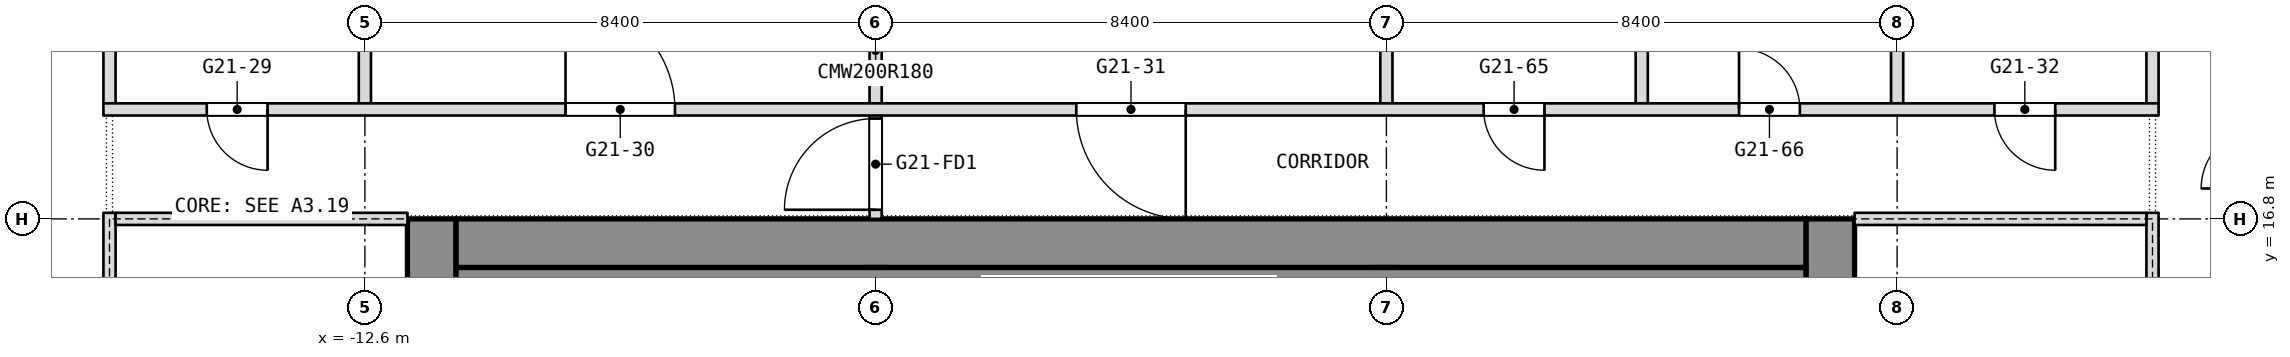
"""IFC4 building model, lengths in metres.
Left out: names, types, materials, properties, quantities, classifications, styles, units other than length and angle.
Written with IfcOpenShell. Run it as: python <this file> out.ifc"""

import sys

from ifc_helpers import new_model, si_unit, direction, frame, frame_2d, origin, place, context, subcontext, project, spatial, rectangle, extrude, element, fill, save


model = new_model("IFC4")
c1 = context("Model", 3, precision=1e-05, world=origin(), true_north=direction((0.0, 1.0)))
c2 = subcontext(c1, "Body", "Model", "MODEL_VIEW")
j1 = project(units=[si_unit("LENGTHUNIT", "METRE"), si_unit("PLANEANGLEUNIT", "RADIAN")], contexts=[c1])
p1 = place(None, origin())
s1 = spatial("IfcSite", under=j1, at=p1, CompositionType="ELEMENT")
p2 = place(p1, origin())
s2 = spatial("IfcBuilding", under=s1, at=p2, CompositionType="ELEMENT")
p3 = place(p2, frame((0.0, 0.0, 248.9)))
s3 = spatial("IfcBuildingStorey", under=s2, at=p3, CompositionType="ELEMENT", Elevation=248.9)
p4 = place(p3, frame((11.5, 0.0, 0.0), z_axis=(0.0, 0.0, 1.0), x_axis=(0.0, 1.0, 0.0)))
e1 = element("IfcWall", 1, at=p4, inside=s3, PredefinedType="SHEAR", context=c2, shape_type="SweptSolid", body=[
    extrude(rectangle(XDim=16.8, YDim=0.8, at=frame_2d((8.4, 0.0))), origin(), (0.0, 0.0, 1.0), 3.6),
])
p5 = place(p4, frame((2.3, 0.0, 0.0)))
e2 = element("IfcOpeningElement", 2, at=p5, cuts=e1, PredefinedType="OPENING", context=c2, shape_type="SweptSolid", body=[
    extrude(rectangle(XDim=1.1, YDim=2.1, at=frame_2d((0.55, 1.05))), frame((0.0, 0.4, 0.0), z_axis=(0.0, -1.0, 0.0), x_axis=(1.0, 0.0, 0.0)), (0.0, 0.0, 1.0), 0.8),
])
p6 = place(p4, frame((4.85, 0.0, 0.0)))
e3 = element("IfcOpeningElement", 3, at=p6, cuts=e1, PredefinedType="OPENING", context=c2, shape_type="SweptSolid", body=[
    extrude(rectangle(XDim=1.1, YDim=2.1, at=frame_2d((0.55, 1.05))), frame((0.0, 0.4, 0.0), z_axis=(0.0, -1.0, 0.0), x_axis=(1.0, 0.0, 0.0)), (0.0, 0.0, 1.0), 0.8),
])
p7 = place(p4, frame((6.825, 0.0, 0.0)))
e4 = element("IfcOpeningElement", 4, at=p7, cuts=e1, PredefinedType="OPENING", context=c2, shape_type="SweptSolid", body=[
    extrude(rectangle(XDim=1.2, YDim=2.1, at=frame_2d((0.6, 1.05))), frame((0.0, 0.4, 0.0), z_axis=(0.0, -1.0, 0.0), x_axis=(1.0, 0.0, 0.0)), (0.0, 0.0, 1.0), 0.8),
])
p8 = place(p4, frame((13.4, 0.0, 0.0)))
e5 = element("IfcOpeningElement", 5, at=p8, cuts=e1, PredefinedType="OPENING", context=c2, shape_type="SweptSolid", body=[
    extrude(rectangle(XDim=1.1, YDim=2.1, at=frame_2d((0.55, 1.05))), frame((0.0, 0.4, 0.0), z_axis=(0.0, -1.0, 0.0), x_axis=(1.0, 0.0, 0.0)), (0.0, 0.0, 1.0), 0.8),
])
p9 = place(p4, frame((10.85, 0.0, 0.0)))
e6 = element("IfcOpeningElement", 6, at=p9, cuts=e1, PredefinedType="OPENING", context=c2, shape_type="SweptSolid", body=[
    extrude(rectangle(XDim=1.1, YDim=2.1, at=frame_2d((0.55, 1.05))), frame((0.0, 0.4, 0.0), z_axis=(0.0, -1.0, 0.0), x_axis=(1.0, 0.0, 0.0)), (0.0, 0.0, 1.0), 0.8),
])
p10 = place(p4, frame((8.775, 0.0, 0.0)))
e7 = element("IfcOpeningElement", 7, at=p10, cuts=e1, PredefinedType="OPENING", context=c2, shape_type="SweptSolid", body=[
    extrude(rectangle(XDim=1.2, YDim=2.1, at=frame_2d((0.6, 1.05))), frame((0.0, 0.4, 0.0), z_axis=(0.0, -1.0, 0.0), x_axis=(1.0, 0.0, 0.0)), (0.0, 0.0, 1.0), 0.8),
])
p11 = place(p3, frame((-11.5, 0.0, 0.0), z_axis=(0.0, 0.0, 1.0), x_axis=(0.0, 1.0, 0.0)))
e8 = element("IfcWall", 8, at=p11, inside=s3, PredefinedType="SHEAR", context=c2, shape_type="SweptSolid", body=[
    extrude(rectangle(XDim=16.8, YDim=0.8, at=frame_2d((8.4, 0.0))), origin(), (0.0, 0.0, 1.0), 3.6),
])
p12 = place(p11, frame((3.6, 0.0, 0.0)))
e9 = element("IfcOpeningElement", 9, at=p12, cuts=e8, PredefinedType="OPENING", context=c2, shape_type="SweptSolid", body=[
    extrude(rectangle(XDim=0.9, YDim=2.1, at=frame_2d((0.45, 1.05))), frame((0.0, 0.4, 0.0), z_axis=(0.0, -1.0, 0.0), x_axis=(1.0, 0.0, 0.0)), (0.0, 0.0, 1.0), 0.8),
])
p13 = place(p11, frame((6.825, 0.0, 0.0)))
e10 = element("IfcOpeningElement", 10, at=p13, cuts=e8, PredefinedType="OPENING", context=c2, shape_type="SweptSolid", body=[
    extrude(rectangle(XDim=1.2, YDim=2.1, at=frame_2d((0.6, 1.05))), frame((0.0, 0.4, 0.0), z_axis=(0.0, -1.0, 0.0), x_axis=(1.0, 0.0, 0.0)), (0.0, 0.0, 1.0), 0.8),
])
p14 = place(p11, frame((14.062, 0.0, 0.0)))
e11 = element("IfcOpeningElement", 11, at=p14, cuts=e8, PredefinedType="OPENING", context=c2, shape_type="SweptSolid", body=[
    extrude(rectangle(XDim=0.9, YDim=2.1, at=frame_2d((0.45, 1.05))), frame((0.0, 0.4, 0.0), z_axis=(0.0, -1.0, 0.0), x_axis=(1.0, 0.0, 0.0)), (0.0, 0.0, 1.0), 0.8),
])
p15 = place(p11, frame((11.438, 0.0, 0.0)))
e12 = element("IfcOpeningElement", 12, at=p15, cuts=e8, PredefinedType="OPENING", context=c2, shape_type="SweptSolid", body=[
    extrude(rectangle(XDim=0.9, YDim=2.1, at=frame_2d((0.45, 1.05))), frame((0.0, 0.4, 0.0), z_axis=(0.0, -1.0, 0.0), x_axis=(1.0, 0.0, 0.0)), (0.0, 0.0, 1.0), 0.8),
])
p16 = place(p11, frame((8.775, 0.0, 0.0)))
e13 = element("IfcOpeningElement", 13, at=p16, cuts=e8, PredefinedType="OPENING", context=c2, shape_type="SweptSolid", body=[
    extrude(rectangle(XDim=1.2, YDim=2.1, at=frame_2d((0.6, 1.05))), frame((0.0, 0.4, 0.0), z_axis=(0.0, -1.0, 0.0), x_axis=(1.0, 0.0, 0.0)), (0.0, 0.0, 1.0), 0.8),
])
p17 = place(p3, frame((-11.1, 16.4, 0.0), z_axis=(0.0, 0.0, 1.0), x_axis=(1.0, 0.0, 0.0)))
e14 = element("IfcWall", 14, at=p17, inside=s3, PredefinedType="SHEAR", context=c2, shape_type="SweptSolid", body=[
    extrude(rectangle(XDim=22.2, YDim=0.8, at=frame_2d((11.1, 0.0))), origin(), (0.0, 0.0, 1.0), 3.6),
])
p18 = place(p3, frame((-4.2, 0.8, 0.0), z_axis=(0.0, 0.0, 1.0), x_axis=(0.0, 1.0, 0.0)))
e15 = element("IfcWall", 15, at=p18, inside=s3, PredefinedType="SHEAR", context=c2, shape_type="SweptSolid", body=[
    extrude(rectangle(XDim=15.2, YDim=0.4, at=frame_2d((7.6, 0.0))), origin(), (0.0, 0.0, 1.0), 3.6),
])
p19 = place(p18, frame((8.5, 0.0, 0.0)))
e16 = element("IfcOpeningElement", 16, at=p19, cuts=e15, PredefinedType="OPENING", context=c2, shape_type="SweptSolid", body=[
    extrude(rectangle(XDim=1.2, YDim=2.1, at=frame_2d((0.6, 1.05))), frame((0.0, 0.2, 0.0), z_axis=(0.0, -1.0, 0.0), x_axis=(1.0, 0.0, 0.0)), (0.0, 0.0, 1.0), 0.4),
])
p20 = place(p3, frame((4.2, 0.8, 0.0), z_axis=(0.0, 0.0, 1.0), x_axis=(0.0, 1.0, 0.0)))
e17 = element("IfcWall", 17, at=p20, inside=s3, PredefinedType="SHEAR", context=c2, shape_type="SweptSolid", body=[
    extrude(rectangle(XDim=15.2, YDim=0.4, at=frame_2d((7.6, 0.0))), origin(), (0.0, 0.0, 1.0), 3.6),
])
p21 = place(p20, frame((5.95, 0.0, 0.0)))
e18 = element("IfcOpeningElement", 18, at=p21, cuts=e17, PredefinedType="OPENING", context=c2, shape_type="SweptSolid", body=[
    extrude(rectangle(XDim=1.2, YDim=2.1, at=frame_2d((0.6, 1.05))), frame((0.0, 0.2, 0.0), z_axis=(0.0, -1.0, 0.0), x_axis=(1.0, 0.0, 0.0)), (0.0, 0.0, 1.0), 0.4),
])
for number, where, z_axis, x_axis in (
    (19, (16.8, 18.7, 0.0), (0.0, 0.0, 1.0), (0.0, 1.0, 0.0)),
    (20, (12.6, 18.7, 0.0), (0.0, 0.0, 1.0), (0.0, 1.0, 0.0)),
    (21, (8.4, 18.7, 0.0), (0.0, 0.0, 1.0), (0.0, 1.0, 0.0)),
    (22, (4.2, 18.7, 0.0), (0.0, 0.0, 1.0), (0.0, 1.0, 0.0)),
):
    element("IfcWall", number, at=place(p3, frame(where, z_axis=z_axis, x_axis=x_axis)), inside=s3, PredefinedType="PARTITIONING", context=c2, shape_type="SweptSolid", body=[
        extrude(rectangle(XDim=3.64, YDim=0.2, at=frame_2d((1.82, 0.0))), origin(), (0.0, 0.0, 1.0), 3.3),
    ])
p22 = place(p3, frame((-4.2, 16.8, 0.0), z_axis=(0.0, 0.0, 1.0), x_axis=(0.0, 1.0, 0.0)))
e23 = element("IfcWall", 23, at=p22, inside=s3, PredefinedType="PARTITIONING", context=c2, shape_type="SweptSolid", body=[
    extrude(rectangle(XDim=5.54, YDim=0.2, at=frame_2d((2.77, 0.0))), origin(), (0.0, 0.0, 1.0), 3.3),
])
p23 = place(p22, frame((0.15, 0.0, 0.0)))
e24 = element("IfcOpeningElement", 24, at=p23, cuts=e23, PredefinedType="OPENING", context=c2, shape_type="SweptSolid", body=[
    extrude(rectangle(XDim=1.5, YDim=2.1, at=frame_2d((0.75, 1.05))), frame((0.0, 0.1, 0.0), z_axis=(0.0, -1.0, 0.0), x_axis=(1.0, 0.0, 0.0)), (0.0, 0.0, 1.0), 0.2),
])
for number, where, z_axis, x_axis in (
    (25, (-12.6, 18.7, 0.0), (0.0, 0.0, 1.0), (0.0, 1.0, 0.0)),
    (26, (-16.8, 18.7, 0.0), (0.0, 0.0, 1.0), (0.0, 1.0, 0.0)),
):
    element("IfcWall", number, at=place(p3, frame(where, z_axis=z_axis, x_axis=x_axis)), inside=s3, PredefinedType="PARTITIONING", context=c2, shape_type="SweptSolid", body=[
        extrude(rectangle(XDim=3.64, YDim=0.2, at=frame_2d((1.82, 0.0))), origin(), (0.0, 0.0, 1.0), 3.3),
    ])
p24 = place(p3, frame((-16.9, 18.6, 0.0), z_axis=(0.0, 0.0, 1.0), x_axis=(1.0, 0.0, 0.0)))
e27 = element("IfcWall", 27, at=p24, inside=s3, PredefinedType="PARTITIONING", context=c2, shape_type="SweptSolid", body=[
    extrude(rectangle(XDim=33.8, YDim=0.2, at=frame_2d((16.9, 0.0))), origin(), (0.0, 0.0, 1.0), 3.3),
])
p25 = place(p24, frame((1.7, 0.0, 0.0)))
e28 = element("IfcOpeningElement", 28, at=p25, cuts=e27, PredefinedType="OPENING", context=c2, shape_type="SweptSolid", body=[
    extrude(rectangle(XDim=1.0, YDim=2.1, at=frame_2d((0.5, 1.05))), frame((0.0, 0.1, 0.0), z_axis=(0.0, -1.0, 0.0), x_axis=(1.0, 0.0, 0.0)), (0.0, 0.0, 1.0), 0.2),
])
p26 = place(p24, frame((7.6, 0.0, 0.0)))
e29 = element("IfcOpeningElement", 29, at=p26, cuts=e27, PredefinedType="OPENING", context=c2, shape_type="SweptSolid", body=[
    extrude(rectangle(XDim=1.8, YDim=2.1, at=frame_2d((0.9, 1.05))), frame((0.0, 0.1, 0.0), z_axis=(0.0, -1.0, 0.0), x_axis=(1.0, 0.0, 0.0)), (0.0, 0.0, 1.0), 0.2),
])
p27 = place(p24, frame((16.0, 0.0, 0.0)))
e30 = element("IfcOpeningElement", 30, at=p27, cuts=e27, PredefinedType="OPENING", context=c2, shape_type="SweptSolid", body=[
    extrude(rectangle(XDim=1.8, YDim=2.1, at=frame_2d((0.9, 1.05))), frame((0.0, 0.1, 0.0), z_axis=(0.0, -1.0, 0.0), x_axis=(1.0, 0.0, 0.0)), (0.0, 0.0, 1.0), 0.2),
])
p28 = place(p24, frame((31.1, 0.0, 0.0)))
e31 = element("IfcOpeningElement", 31, at=p28, cuts=e27, PredefinedType="OPENING", context=c2, shape_type="SweptSolid", body=[
    extrude(rectangle(XDim=1.0, YDim=2.1, at=frame_2d((0.5, 1.05))), frame((0.0, 0.1, 0.0), z_axis=(0.0, -1.0, 0.0), x_axis=(1.0, 0.0, 0.0)), (0.0, 0.0, 1.0), 0.2),
])
p29 = place(p24, frame((22.7, 0.0, 0.0)))
e32 = element("IfcOpeningElement", 32, at=p29, cuts=e27, PredefinedType="OPENING", context=c2, shape_type="SweptSolid", body=[
    extrude(rectangle(XDim=1.0, YDim=2.1, at=frame_2d((0.5, 1.05))), frame((0.0, 0.1, 0.0), z_axis=(0.0, -1.0, 0.0), x_axis=(1.0, 0.0, 0.0)), (0.0, 0.0, 1.0), 0.2),
])
p30 = place(p24, frame((26.9, 0.0, 0.0)))
e33 = element("IfcOpeningElement", 33, at=p30, cuts=e27, PredefinedType="OPENING", context=c2, shape_type="SweptSolid", body=[
    extrude(rectangle(XDim=1.0, YDim=2.1, at=frame_2d((0.5, 1.05))), frame((0.0, 0.1, 0.0), z_axis=(0.0, -1.0, 0.0), x_axis=(1.0, 0.0, 0.0)), (0.0, 0.0, 1.0), 0.2),
])
p31 = place(p3, frame((-11.1, 15.65, 0.0), z_axis=(0.0, 0.0, 1.0), x_axis=(1.0, 0.0, 0.0)))
e34 = element("IfcWall", 34, at=p31, inside=s3, PredefinedType="PARTITIONING", context=c2, shape_type="SweptSolid", body=[
    extrude(rectangle(XDim=22.2, YDim=0.7, at=frame_2d((11.1, 0.0))), origin(), (0.0, 0.0, 1.0), 3.3),
])
p32 = place(p3, frame((-16.8, -0.1, 0.0), z_axis=(0.0, 0.0, 1.0), x_axis=(0.0, 1.0, 0.0)))
e35 = element("IfcWall", 35, at=p32, inside=s3, PredefinedType="PARTITIONING", context=c2, shape_type="SweptSolid", body=[
    extrude(rectangle(XDim=17.0, YDim=0.2, at=frame_2d((8.5, 0.0))), origin(), (0.0, 0.0, 1.0), 3.3),
])
p33 = place(p32, frame((2.2, 0.0, 0.0)))
e36 = element("IfcOpeningElement", 36, at=p33, cuts=e35, PredefinedType="OPENING", context=c2, shape_type="SweptSolid", body=[
    extrude(rectangle(XDim=1.8, YDim=2.1, at=frame_2d((0.9, 1.05))), frame((0.0, 0.1, 0.0), z_axis=(0.0, -1.0, 0.0), x_axis=(1.0, 0.0, 0.0)), (0.0, 0.0, 1.0), 0.2),
])
p34 = place(p32, frame((13.0, 0.0, 0.0)))
e37 = element("IfcOpeningElement", 37, at=p34, cuts=e35, PredefinedType="OPENING", context=c2, shape_type="SweptSolid", body=[
    extrude(rectangle(XDim=1.8, YDim=2.1, at=frame_2d((0.9, 1.05))), frame((0.0, 0.1, 0.0), z_axis=(0.0, -1.0, 0.0), x_axis=(1.0, 0.0, 0.0)), (0.0, 0.0, 1.0), 0.2),
])
p35 = place(p3, frame((-16.7, 16.8, 0.0), z_axis=(0.0, 0.0, 1.0), x_axis=(1.0, 0.0, 0.0)))
e38 = element("IfcWall", 38, at=p35, inside=s3, PredefinedType="PARTITIONING", context=c2, shape_type="SweptSolid", body=[
    extrude(rectangle(XDim=4.8, YDim=0.2, at=frame_2d((2.4, 0.0))), origin(), (0.0, 0.0, 1.0), 2.9),
])
p36 = place(p3, frame((16.8, -0.1, 0.0), z_axis=(0.0, 0.0, 1.0), x_axis=(0.0, 1.0, 0.0)))
e39 = element("IfcWall", 39, at=p36, inside=s3, PredefinedType="PARTITIONING", context=c2, shape_type="SweptSolid", body=[
    extrude(rectangle(XDim=17.0, YDim=0.2, at=frame_2d((8.5, 0.0))), origin(), (0.0, 0.0, 1.0), 3.3),
])
p37 = place(p36, frame((2.2, 0.0, 0.0)))
e40 = element("IfcOpeningElement", 40, at=p37, cuts=e39, PredefinedType="OPENING", context=c2, shape_type="SweptSolid", body=[
    extrude(rectangle(XDim=1.8, YDim=2.1, at=frame_2d((0.9, 1.05))), frame((0.0, 0.1, 0.0), z_axis=(0.0, -1.0, 0.0), x_axis=(1.0, 0.0, 0.0)), (0.0, 0.0, 1.0), 0.2),
])
p38 = place(p36, frame((13.0, 0.0, 0.0)))
e41 = element("IfcOpeningElement", 41, at=p38, cuts=e39, PredefinedType="OPENING", context=c2, shape_type="SweptSolid", body=[
    extrude(rectangle(XDim=1.8, YDim=2.1, at=frame_2d((0.9, 1.05))), frame((0.0, 0.1, 0.0), z_axis=(0.0, -1.0, 0.0), x_axis=(1.0, 0.0, 0.0)), (0.0, 0.0, 1.0), 0.2),
])
p39 = place(p3, frame((11.9, 16.8, 0.0), z_axis=(0.0, 0.0, 1.0), x_axis=(1.0, 0.0, 0.0)))
e42 = element("IfcWall", 42, at=p39, inside=s3, PredefinedType="PARTITIONING", context=c2, shape_type="SweptSolid", body=[
    extrude(rectangle(XDim=4.8, YDim=0.2, at=frame_2d((2.4, 0.0))), origin(), (0.0, 0.0, 1.0), 2.9),
])
p40 = place(p25, origin())
e43 = element("IfcDoor", 43, at=p40, inside=s3, OperationType="SINGLE_SWING_LEFT", PredefinedType="DOOR", context=c2, shape_type="SweptSolid", body=[
    extrude(rectangle(XDim=1.0, YDim=2.1, at=frame_2d((0.5, 1.05))), frame((0.0, 0.025, 0.0), z_axis=(0.0, -1.0, 0.0), x_axis=(1.0, 0.0, 0.0)), (0.0, 0.0, 1.0), 0.05),
])
fill(e28, e43)
p41 = place(p26, origin())
e44 = element("IfcDoor", 44, at=p41, inside=s3, OperationType="DOUBLE_DOOR_SINGLE_SWING", PredefinedType="DOOR", context=c2, shape_type="SweptSolid", body=[
    extrude(rectangle(XDim=1.8, YDim=2.1, at=frame_2d((0.9, 1.05))), frame((0.0, 0.025, 0.0), z_axis=(0.0, -1.0, 0.0), x_axis=(1.0, 0.0, 0.0)), (0.0, 0.0, 1.0), 0.05),
])
fill(e29, e44)
p42 = place(p27, origin())
e45 = element("IfcDoor", 45, at=p42, inside=s3, OperationType="DOUBLE_DOOR_SINGLE_SWING", PredefinedType="DOOR", context=c2, shape_type="SweptSolid", body=[
    extrude(rectangle(XDim=1.8, YDim=2.1, at=frame_2d((0.9, 1.05))), frame((0.0, 0.025, 0.0), z_axis=(0.0, -1.0, 0.0), x_axis=(1.0, 0.0, 0.0)), (0.0, 0.0, 1.0), 0.05),
])
fill(e30, e45)
p43 = place(p28, origin())
e46 = element("IfcDoor", 46, at=p43, inside=s3, OperationType="SINGLE_SWING_RIGHT", PredefinedType="DOOR", context=c2, shape_type="SweptSolid", body=[
    extrude(rectangle(XDim=1.0, YDim=2.1, at=frame_2d((0.5, 1.05))), frame((0.0, 0.025, 0.0), z_axis=(0.0, -1.0, 0.0), x_axis=(1.0, 0.0, 0.0)), (0.0, 0.0, 1.0), 0.05),
])
fill(e31, e46)
p44 = place(p29, origin())
e47 = element("IfcDoor", 47, at=p44, inside=s3, OperationType="SINGLE_SWING_LEFT", PredefinedType="DOOR", context=c2, shape_type="SweptSolid", body=[
    extrude(rectangle(XDim=1.0, YDim=2.1, at=frame_2d((0.5, 1.05))), frame((0.0, 0.025, 0.0), z_axis=(0.0, -1.0, 0.0), x_axis=(1.0, 0.0, 0.0)), (0.0, 0.0, 1.0), 0.05),
])
fill(e32, e47)
p45 = place(p30, origin())
e48 = element("IfcDoor", 48, at=p45, inside=s3, OperationType="SINGLE_SWING_RIGHT", PredefinedType="DOOR", context=c2, shape_type="SweptSolid", body=[
    extrude(rectangle(XDim=1.0, YDim=2.1, at=frame_2d((0.5, 1.05))), frame((0.0, 0.025, 0.0), z_axis=(0.0, -1.0, 0.0), x_axis=(1.0, 0.0, 0.0)), (0.0, 0.0, 1.0), 0.05),
])
fill(e33, e48)
p46 = place(p23, origin())
e49 = element("IfcDoor", 49, at=p46, inside=s3, OperationType="DOUBLE_DOOR_DOUBLE_SWING", PredefinedType="DOOR", context=c2, shape_type="SweptSolid", body=[
    extrude(rectangle(XDim=1.5, YDim=2.1, at=frame_2d((0.75, 1.05))), frame((0.0, 0.025, 0.0), z_axis=(0.0, -1.0, 0.0), x_axis=(1.0, 0.0, 0.0)), (0.0, 0.0, 1.0), 0.05),
])
fill(e24, e49)
save(model, sys.argv[1])
